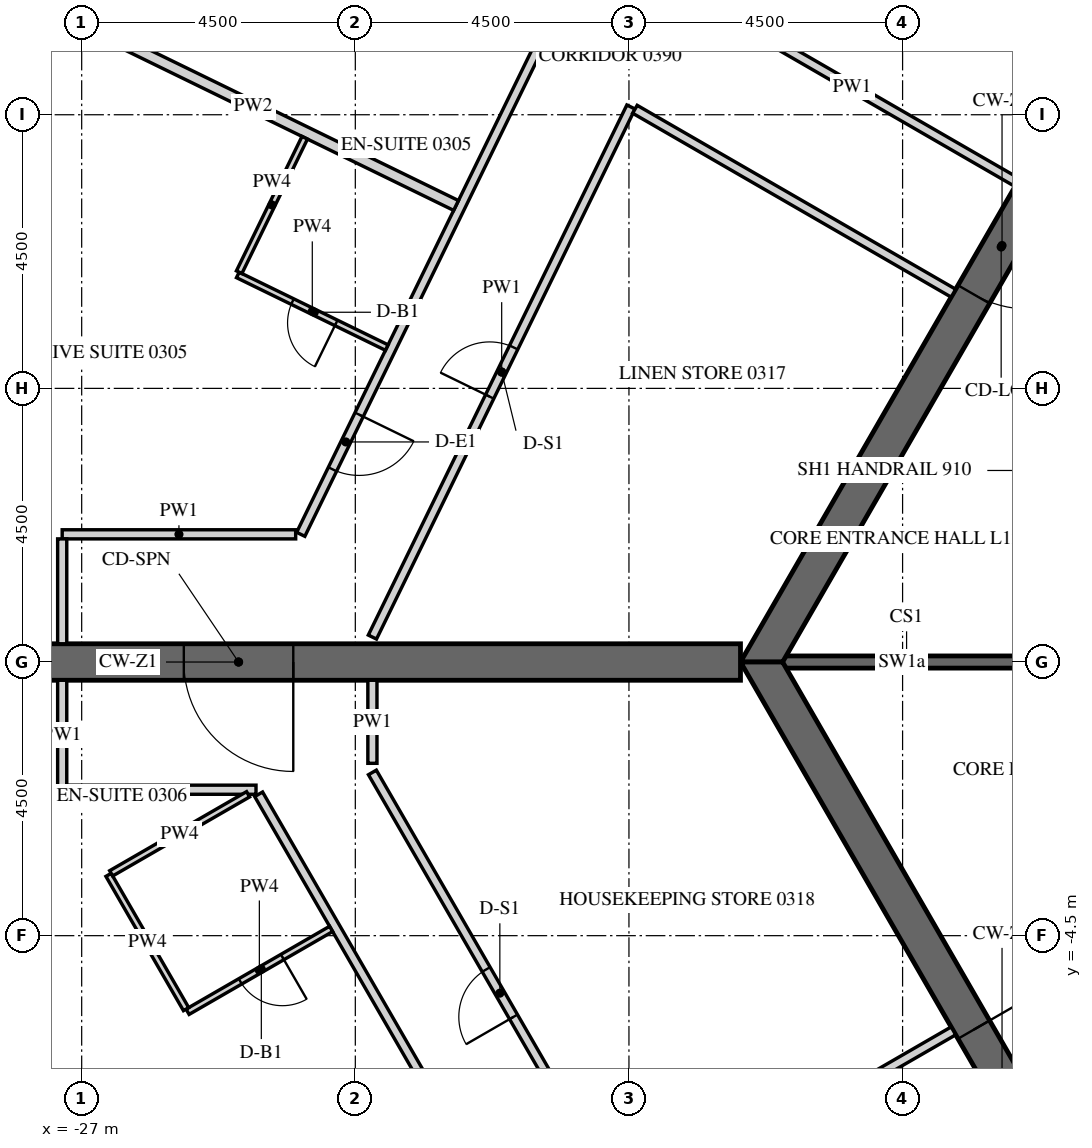
"""IFC4 building model, lengths in metres.
Left out: names, types, materials, properties, quantities, classifications, styles, units other than length and angle.
Written with IfcOpenShell. Run it as: python <this file> out.ifc"""

import sys

from ifc_helpers import new_model, si_unit, direction, frame, frame_2d, origin, place, context, subcontext, project, spatial, polyline, rectangle, outline, extrude, element, fill, save


model = new_model("IFC4")
c1 = context("Model", 3, precision=1e-05, world=origin(), true_north=direction((0.0, 1.0)))
c2 = subcontext(c1, "Body", "Model", "MODEL_VIEW")
j1 = project(units=[si_unit("LENGTHUNIT", "METRE"), si_unit("PLANEANGLEUNIT", "RADIAN")], contexts=[c1])
p1 = place(None, origin())
s1 = spatial("IfcSite", under=j1, at=p1, CompositionType="ELEMENT")
p2 = place(p1, origin())
s2 = spatial("IfcBuilding", under=s1, at=p2, CompositionType="ELEMENT")
p3 = place(p2, frame((0.0, 0.0, 60.9)))
s3 = spatial("IfcBuildingStorey", under=s2, at=p3, CompositionType="ELEMENT", Elevation=60.9)
p4 = place(p3, frame((-19.595, 27.633, -0.15), z_axis=(0.0, 0.0, 1.0), x_axis=(-0.438368285794, -0.898795441694, 0.0)))
e1 = element("IfcWall", 1, at=p4, inside=s3, PredefinedType="SOLIDWALL", context=c2, shape_type="SweptSolid", body=[
    extrude(outline(polyline([(-0.026, -0.275), (30.093, -0.275), (30.048, 0.275), (0.026, 0.275), (-0.026, -0.275)])), origin(), (0.0, 0.0, 1.0), 3.9),
])
p5 = place(p4, frame((1.236, 0.0, 1.05)))
e2 = element("IfcOpeningElement", 2, at=p5, cuts=e1, PredefinedType="OPENING", context=c2, shape_type="SweptSolid", body=[
    extrude(rectangle(XDim=2.4, YDim=2.4, at=frame_2d((1.2, 1.2))), frame((0.0, 0.285, 0.0), z_axis=(0.0, -1.0, 0.0), x_axis=(1.0, 0.0, 0.0)), (0.0, 0.0, 1.0), 0.57),
])
p6 = place(p4, frame((4.835, 0.0, 1.05)))
e3 = element("IfcOpeningElement", 3, at=p6, cuts=e1, PredefinedType="OPENING", context=c2, shape_type="SweptSolid", body=[
    extrude(rectangle(XDim=2.4, YDim=2.4, at=frame_2d((1.2, 1.2))), frame((0.0, 0.285, 0.0), z_axis=(0.0, -1.0, 0.0), x_axis=(1.0, 0.0, 0.0)), (0.0, 0.0, 1.0), 0.57),
])
p7 = place(p4, frame((8.436, 0.0, 1.05)))
e4 = element("IfcOpeningElement", 4, at=p7, cuts=e1, PredefinedType="OPENING", context=c2, shape_type="SweptSolid", body=[
    extrude(rectangle(XDim=2.4, YDim=2.4, at=frame_2d((1.2, 1.2))), frame((0.0, 0.285, 0.0), z_axis=(0.0, -1.0, 0.0), x_axis=(1.0, 0.0, 0.0)), (0.0, 0.0, 1.0), 0.57),
])
p8 = place(p4, frame((12.035, 0.0, 1.05)))
e5 = element("IfcOpeningElement", 5, at=p8, cuts=e1, PredefinedType="OPENING", context=c2, shape_type="SweptSolid", body=[
    extrude(rectangle(XDim=2.4, YDim=2.4, at=frame_2d((1.2, 1.2))), frame((0.0, 0.285, 0.0), z_axis=(0.0, -1.0, 0.0), x_axis=(1.0, 0.0, 0.0)), (0.0, 0.0, 1.0), 0.57),
])
p9 = place(p4, frame((15.635, 0.0, 1.05)))
e6 = element("IfcOpeningElement", 6, at=p9, cuts=e1, PredefinedType="OPENING", context=c2, shape_type="SweptSolid", body=[
    extrude(rectangle(XDim=2.4, YDim=2.4, at=frame_2d((1.2, 1.2))), frame((0.0, 0.285, 0.0), z_axis=(0.0, -1.0, 0.0), x_axis=(1.0, 0.0, 0.0)), (0.0, 0.0, 1.0), 0.57),
])
p10 = place(p4, frame((19.236, 0.0, 1.05)))
e7 = element("IfcOpeningElement", 7, at=p10, cuts=e1, PredefinedType="OPENING", context=c2, shape_type="SweptSolid", body=[
    extrude(rectangle(XDim=2.4, YDim=2.4, at=frame_2d((1.2, 1.2))), frame((0.0, 0.285, 0.0), z_axis=(0.0, -1.0, 0.0), x_axis=(1.0, 0.0, 0.0)), (0.0, 0.0, 1.0), 0.57),
])
p11 = place(p4, frame((22.835, 0.0, 1.05)))
e8 = element("IfcOpeningElement", 8, at=p11, cuts=e1, PredefinedType="OPENING", context=c2, shape_type="SweptSolid", body=[
    extrude(rectangle(XDim=2.4, YDim=2.4, at=frame_2d((1.2, 1.2))), frame((0.0, 0.285, 0.0), z_axis=(0.0, -1.0, 0.0), x_axis=(1.0, 0.0, 0.0)), (0.0, 0.0, 1.0), 0.57),
])
p12 = place(p4, frame((26.436, 0.0, 1.05)))
e9 = element("IfcOpeningElement", 9, at=p12, cuts=e1, PredefinedType="OPENING", context=c2, shape_type="SweptSolid", body=[
    extrude(rectangle(XDim=2.4, YDim=2.4, at=frame_2d((1.2, 1.2))), frame((0.0, 0.285, 0.0), z_axis=(0.0, -1.0, 0.0), x_axis=(1.0, 0.0, 0.0)), (0.0, 0.0, 1.0), 0.57),
])
p13 = place(p3, frame((-32.655, -2.89, -0.15), z_axis=(0.0, 0.0, 1.0), x_axis=(0.499997711317, -0.866026725152, 0.0)))
e10 = element("IfcWall", 10, at=p13, inside=s3, PredefinedType="SOLIDWALL", context=c2, shape_type="SweptSolid", body=[
    extrude(outline(polyline([(-0.022, -0.275), (30.097, -0.275), (30.045, 0.275), (0.022, 0.275), (-0.022, -0.275)])), origin(), (0.0, 0.0, 1.0), 3.9),
])
p14 = place(p13, frame((1.236, 0.0, 1.05)))
e11 = element("IfcOpeningElement", 11, at=p14, cuts=e10, PredefinedType="OPENING", context=c2, shape_type="SweptSolid", body=[
    extrude(rectangle(XDim=2.4, YDim=2.4, at=frame_2d((1.2, 1.2))), frame((0.0, 0.285, 0.0), z_axis=(0.0, -1.0, 0.0), x_axis=(1.0, 0.0, 0.0)), (0.0, 0.0, 1.0), 0.57),
])
p15 = place(p13, frame((4.835, 0.0, 1.05)))
e12 = element("IfcOpeningElement", 12, at=p15, cuts=e10, PredefinedType="OPENING", context=c2, shape_type="SweptSolid", body=[
    extrude(rectangle(XDim=2.4, YDim=2.4, at=frame_2d((1.2, 1.2))), frame((0.0, 0.285, 0.0), z_axis=(0.0, -1.0, 0.0), x_axis=(1.0, 0.0, 0.0)), (0.0, 0.0, 1.0), 0.57),
])
p16 = place(p13, frame((8.436, 0.0, 1.05)))
e13 = element("IfcOpeningElement", 13, at=p16, cuts=e10, PredefinedType="OPENING", context=c2, shape_type="SweptSolid", body=[
    extrude(rectangle(XDim=2.4, YDim=2.4, at=frame_2d((1.2, 1.2))), frame((0.0, 0.285, 0.0), z_axis=(0.0, -1.0, 0.0), x_axis=(1.0, 0.0, 0.0)), (0.0, 0.0, 1.0), 0.57),
])
p17 = place(p13, frame((12.035, 0.0, 1.05)))
e14 = element("IfcOpeningElement", 14, at=p17, cuts=e10, PredefinedType="OPENING", context=c2, shape_type="SweptSolid", body=[
    extrude(rectangle(XDim=2.4, YDim=2.4, at=frame_2d((1.2, 1.2))), frame((0.0, 0.285, 0.0), z_axis=(0.0, -1.0, 0.0), x_axis=(1.0, 0.0, 0.0)), (0.0, 0.0, 1.0), 0.57),
])
p18 = place(p13, frame((15.635, 0.0, 1.05)))
e15 = element("IfcOpeningElement", 15, at=p18, cuts=e10, PredefinedType="OPENING", context=c2, shape_type="SweptSolid", body=[
    extrude(rectangle(XDim=2.4, YDim=2.4, at=frame_2d((1.2, 1.2))), frame((0.0, 0.285, 0.0), z_axis=(0.0, -1.0, 0.0), x_axis=(1.0, 0.0, 0.0)), (0.0, 0.0, 1.0), 0.57),
])
p19 = place(p13, frame((19.236, 0.0, 1.05)))
e16 = element("IfcOpeningElement", 16, at=p19, cuts=e10, PredefinedType="OPENING", context=c2, shape_type="SweptSolid", body=[
    extrude(rectangle(XDim=2.4, YDim=2.4, at=frame_2d((1.2, 1.2))), frame((0.0, 0.285, 0.0), z_axis=(0.0, -1.0, 0.0), x_axis=(1.0, 0.0, 0.0)), (0.0, 0.0, 1.0), 0.57),
])
p20 = place(p13, frame((22.835, 0.0, 1.05)))
e17 = element("IfcOpeningElement", 17, at=p20, cuts=e10, PredefinedType="OPENING", context=c2, shape_type="SweptSolid", body=[
    extrude(rectangle(XDim=2.4, YDim=2.4, at=frame_2d((1.2, 1.2))), frame((0.0, 0.285, 0.0), z_axis=(0.0, -1.0, 0.0), x_axis=(1.0, 0.0, 0.0)), (0.0, 0.0, 1.0), 0.57),
])
p21 = place(p13, frame((26.436, 0.0, 1.05)))
e18 = element("IfcOpeningElement", 18, at=p21, cuts=e10, PredefinedType="OPENING", context=c2, shape_type="SweptSolid", body=[
    extrude(rectangle(XDim=2.4, YDim=2.4, at=frame_2d((1.2, 1.2))), frame((0.0, 0.285, 0.0), z_axis=(0.0, -1.0, 0.0), x_axis=(1.0, 0.0, 0.0)), (0.0, 0.0, 1.0), 0.57),
])
p22 = place(p3, frame((-7.91, 13.7, -0.15), z_axis=(0.0, 0.0, 1.0), x_axis=(-0.499999880136, -0.866025472988, 0.0)))
e19 = element("IfcWall", 19, at=p22, inside=s3, PredefinedType="SHEAR", context=c2, shape_type="SweptSolid", body=[
    extrude(outline(polyline([(-0.173, -0.3), (15.993, -0.3), (15.646, 0.3), (0.173, 0.3), (-0.173, -0.3)])), origin(), (0.0, 0.0, 1.0), 3.9),
])
p23 = place(p22, frame((7.039, 0.0, 0.15)))
e20 = element("IfcOpeningElement", 20, at=p23, cuts=e19, PredefinedType="OPENING", context=c2, shape_type="SweptSolid", body=[
    extrude(rectangle(XDim=1.8, YDim=2.4, at=frame_2d((0.9, 1.2))), frame((0.0, 0.31, 0.0), z_axis=(0.0, -1.0, 0.0), x_axis=(1.0, 0.0, 0.0)), (0.0, 0.0, 1.0), 0.62),
])
p24 = place(p3, frame((-15.819, 0.0, -0.15), z_axis=(0.0, 0.0, 1.0), x_axis=(0.499999880136, -0.866025472988, 0.0)))
e21 = element("IfcWall", 21, at=p24, inside=s3, PredefinedType="SHEAR", context=c2, shape_type="SweptSolid", body=[
    extrude(outline(polyline([(-0.173, -0.3), (15.993, -0.3), (15.646, 0.3), (0.173, 0.3), (-0.173, -0.3)])), origin(), (0.0, 0.0, 1.0), 3.9),
])
p25 = place(p24, frame((6.981, 0.0, 0.15)))
e22 = element("IfcOpeningElement", 22, at=p25, cuts=e21, PredefinedType="OPENING", context=c2, shape_type="SweptSolid", body=[
    extrude(rectangle(XDim=1.8, YDim=2.4, at=frame_2d((0.9, 1.2))), frame((0.0, 0.31, 0.0), z_axis=(0.0, -1.0, 0.0), x_axis=(1.0, 0.0, 0.0)), (0.0, 0.0, 1.0), 0.62),
])
p26 = place(p3, frame((-16.166, 0.0, -0.15), z_axis=(0.0, 0.0, 1.0), x_axis=(-1.0, 0.0, 0.0)))
e23 = element("IfcWall", 23, at=p26, inside=s3, PredefinedType="SHEAR", context=c2, shape_type="SweptSolid", body=[
    extrude(rectangle(XDim=16.509, YDim=0.6, at=frame_2d((8.254, 0.0))), origin(), (0.0, 0.0, 1.0), 3.9),
])
p27 = place(p26, frame((7.354, 0.0, 0.15)))
e24 = element("IfcOpeningElement", 24, at=p27, cuts=e23, PredefinedType="OPENING", context=c2, shape_type="SweptSolid", body=[
    extrude(rectangle(XDim=1.8, YDim=2.4, at=frame_2d((0.9, 1.2))), frame((0.0, 0.31, 0.0), z_axis=(0.0, -1.0, 0.0), x_axis=(1.0, 0.0, 0.0)), (0.0, 0.0, 1.0), 0.62),
])
p28 = place(p3, frame((-11.547, 0.0, -0.15), z_axis=(0.0, 0.0, 1.0), x_axis=(-1.0, 0.0, 0.0)))
e25 = element("IfcWall", 25, at=p28, inside=s3, PredefinedType="SHEAR", context=c2, shape_type="SweptSolid", body=[
    extrude(rectangle(XDim=3.926, YDim=0.2, at=frame_2d((1.963, 0.0))), origin(), (0.0, 0.0, 1.0), 3.9),
])
p29 = place(p3, frame((-13.752, 21.875, 0.0), z_axis=(0.0, 0.0, 1.0), x_axis=(-0.438376846054, -0.898791266559, 0.0)))
e26 = element("IfcWall", 26, at=p29, inside=s3, PredefinedType="PARTITIONING", context=c2, shape_type="SweptSolid", body=[
    extrude(rectangle(XDim=22.002, YDim=0.15, at=frame_2d((11.001, 0.0))), origin(), (0.0, 0.0, 1.0), 2.988),
])
p30 = place(p29, frame((3.269, 0.0, 0.0)))
e27 = element("IfcOpeningElement", 27, at=p30, cuts=e26, PredefinedType="OPENING", context=c2, shape_type="SweptSolid", body=[
    extrude(rectangle(XDim=1.0, YDim=2.1, at=frame_2d((0.5, 1.05))), frame((0.0, 0.085, 0.0), z_axis=(0.0, -1.0, 0.0), x_axis=(1.0, 0.0, 0.0)), (0.0, 0.0, 1.0), 0.17),
])
p31 = place(p29, frame((11.321, 0.0, 0.0)))
e28 = element("IfcOpeningElement", 28, at=p31, cuts=e26, PredefinedType="OPENING", context=c2, shape_type="SweptSolid", body=[
    extrude(rectangle(XDim=1.0, YDim=2.1, at=frame_2d((0.5, 1.05))), frame((0.0, 0.085, 0.0), z_axis=(0.0, -1.0, 0.0), x_axis=(1.0, 0.0, 0.0)), (0.0, 0.0, 1.0), 0.17),
])
p32 = place(p29, frame((19.812, 0.0, 0.0)))
e29 = element("IfcOpeningElement", 29, at=p32, cuts=e26, PredefinedType="OPENING", context=c2, shape_type="SweptSolid", body=[
    extrude(rectangle(XDim=1.0, YDim=2.1, at=frame_2d((0.5, 1.05))), frame((0.0, 0.085, 0.0), z_axis=(0.0, -1.0, 0.0), x_axis=(1.0, 0.0, 0.0)), (0.0, 0.0, 1.0), 0.17),
])
p33 = place(p3, frame((-23.481, 2.1, 0.0), z_axis=(0.0, 0.0, 1.0), x_axis=(-1.0, 0.0, 0.0)))
e30 = element("IfcWall", 30, at=p33, inside=s3, PredefinedType="PARTITIONING", context=c2, shape_type="SweptSolid", body=[
    extrude(rectangle(XDim=3.84, YDim=0.15, at=frame_2d((1.92, 0.0))), origin(), (0.0, 0.0, 1.0), 2.988),
])
p34 = place(p3, frame((-27.32, 2.025, 0.0), z_axis=(0.0, 0.0, 1.0), x_axis=(0.0, -1.0, 0.0)))
e31 = element("IfcWall", 31, at=p34, inside=s3, PredefinedType="PARTITIONING", context=c2, shape_type="SweptSolid", body=[
    extrude(rectangle(XDim=1.725, YDim=0.15, at=frame_2d((0.862, 0.0))), origin(), (0.0, 0.0, 1.0), 2.988),
])
p35 = place(p3, frame((-11.614, 7.884, 0.0), z_axis=(0.0, 0.0, 1.0), x_axis=(-0.866025438137, 0.4999999405, 0.0)))
e32 = element("IfcWall", 32, at=p35, inside=s3, PredefinedType="PARTITIONING", context=c2, shape_type="SweptSolid", body=[
    extrude(rectangle(XDim=6.271, YDim=0.15, at=frame_2d((3.135, 0.0))), origin(), (0.0, 0.0, 1.0), 2.988),
])
p36 = place(p3, frame((-22.219, 0.41, 0.0), z_axis=(0.0, 0.0, 1.0), x_axis=(0.438391891827, 0.898783927972, 0.0)))
e33 = element("IfcWall", 33, at=p36, inside=s3, PredefinedType="PARTITIONING", context=c2, shape_type="SweptSolid", body=[
    extrude(rectangle(XDim=9.699, YDim=0.15, at=frame_2d((4.85, 0.0))), origin(), (0.0, 0.0, 1.0), 2.988),
])
p37 = place(p36, frame((4.4, 0.0, 0.0)))
e34 = element("IfcOpeningElement", 34, at=p37, cuts=e33, PredefinedType="OPENING", context=c2, shape_type="SweptSolid", body=[
    extrude(rectangle(XDim=0.9, YDim=2.1, at=frame_2d((0.45, 1.05))), frame((0.0, 0.085, 0.0), z_axis=(0.0, -1.0, 0.0), x_axis=(1.0, 0.0, 0.0)), (0.0, 0.0, 1.0), 0.17),
])
p38 = place(p3, frame((-17.902, 9.09, 0.0), z_axis=(0.0, 0.0, 1.0), x_axis=(0.866036368755, -0.499981007633, 0.0)))
e35 = element("IfcWall", 35, at=p38, inside=s3, PredefinedType="PARTITIONING", context=c2, shape_type="SweptSolid", body=[
    extrude(rectangle(XDim=6.049, YDim=0.15, at=frame_2d((3.024, 0.0))), origin(), (0.0, 0.0, 1.0), 2.988),
])
p39 = place(p3, frame((-27.32, -0.3, 0.0), z_axis=(0.0, 0.0, 1.0), x_axis=(0.0, -1.0, 0.0)))
e36 = element("IfcWall", 36, at=p39, inside=s3, PredefinedType="PARTITIONING", context=c2, shape_type="SweptSolid", body=[
    extrude(rectangle(XDim=1.8, YDim=0.15, at=frame_2d((0.9, 0.0))), origin(), (0.0, 0.0, 1.0), 2.988),
])
p40 = place(p3, frame((-27.245, -2.1, 0.0), z_axis=(0.0, 0.0, 1.0), x_axis=(1.0, 0.0, 0.0)))
e37 = element("IfcWall", 37, at=p40, inside=s3, PredefinedType="PARTITIONING", context=c2, shape_type="SweptSolid", body=[
    extrude(rectangle(XDim=3.112, YDim=0.15, at=frame_2d((1.556, 0.0))), origin(), (0.0, 0.0, 1.0), 2.988),
])
p41 = place(p3, frame((-24.09, -2.175, 0.0), z_axis=(0.0, 0.0, 1.0), x_axis=(0.499996832073, -0.86602723278, 0.0)))
e38 = element("IfcWall", 38, at=p41, inside=s3, PredefinedType="PARTITIONING", context=c2, shape_type="SweptSolid", body=[
    extrude(rectangle(XDim=23.877, YDim=0.15, at=frame_2d((11.938, 0.0))), origin(), (0.0, 0.0, 1.0), 2.988),
])
p42 = place(p41, frame((6.443, 0.0, 0.0)))
e39 = element("IfcOpeningElement", 39, at=p42, cuts=e38, PredefinedType="OPENING", context=c2, shape_type="SweptSolid", body=[
    extrude(rectangle(XDim=1.0, YDim=2.1, at=frame_2d((0.5, 1.05))), frame((0.0, 0.085, 0.0), z_axis=(0.0, -1.0, 0.0), x_axis=(1.0, 0.0, 0.0)), (0.0, 0.0, 1.0), 0.17),
])
p43 = place(p41, frame((18.425, 0.0, 0.0)))
e40 = element("IfcOpeningElement", 40, at=p43, cuts=e38, PredefinedType="OPENING", context=c2, shape_type="SweptSolid", body=[
    extrude(rectangle(XDim=1.0, YDim=2.1, at=frame_2d((0.5, 1.05))), frame((0.0, 0.085, 0.0), z_axis=(0.0, -1.0, 0.0), x_axis=(1.0, 0.0, 0.0)), (0.0, 0.0, 1.0), 0.17),
])
p44 = place(p3, frame((-12.664, -6.066, 0.0), z_axis=(0.0, 0.0, 1.0), x_axis=(-0.866023618125, -0.500003092839, 0.0)))
e41 = element("IfcWall", 41, at=p44, inside=s3, PredefinedType="PARTITIONING", context=c2, shape_type="SweptSolid", body=[
    extrude(rectangle(XDim=6.15, YDim=0.15, at=frame_2d((3.075, 0.0))), origin(), (0.0, 0.0, 1.0), 2.988),
])
p45 = place(p3, frame((-18.027, -9.076, 0.0), z_axis=(0.0, 0.0, 1.0), x_axis=(-0.500007318041, 0.86602117867, 0.0)))
e42 = element("IfcWall", 42, at=p45, inside=s3, PredefinedType="PARTITIONING", context=c2, shape_type="SweptSolid", body=[
    extrude(rectangle(XDim=8.383, YDim=0.15, at=frame_2d((4.191, 0.0))), origin(), (0.0, 0.0, 1.0), 2.988),
])
p46 = place(p45, frame((3.742, 0.0, 0.0)))
e43 = element("IfcOpeningElement", 43, at=p46, cuts=e42, PredefinedType="OPENING", context=c2, shape_type="SweptSolid", body=[
    extrude(rectangle(XDim=0.9, YDim=2.1, at=frame_2d((0.45, 1.05))), frame((0.0, 0.085, 0.0), z_axis=(0.0, -1.0, 0.0), x_axis=(1.0, 0.0, 0.0)), (0.0, 0.0, 1.0), 0.17),
])
p47 = place(p3, frame((-22.219, -1.666, 0.0), z_axis=(0.0, 0.0, 1.0), x_axis=(0.0, 1.0, 0.0)))
e44 = element("IfcWall", 44, at=p47, inside=s3, PredefinedType="PARTITIONING", context=c2, shape_type="SweptSolid", body=[
    extrude(rectangle(XDim=1.366, YDim=0.15, at=frame_2d((0.683, 0.0))), origin(), (0.0, 0.0, 1.0), 2.988),
])
p48 = place(p3, frame((-27.517, 10.763, 0.0), z_axis=(0.0, 0.0, 1.0), x_axis=(0.898789933843, -0.438379578473, 0.0)))
e45 = element("IfcWall", 45, at=p48, inside=s3, PredefinedType="PARTITIONING", context=c2, shape_type="SweptSolid", body=[
    extrude(rectangle(XDim=7.425, YDim=0.18, at=frame_2d((3.712, 0.0))), origin(), (0.0, 0.0, 1.0), 2.988),
])
p49 = place(p3, frame((-21.983, 5.171, 0.0), z_axis=(0.0, 0.0, 1.0), x_axis=(-0.898791692788, 0.43837597217, 0.0)))
e46 = element("IfcWall", 46, at=p49, inside=s3, PredefinedType="PARTITIONING", context=c2, shape_type="SweptSolid", body=[
    extrude(rectangle(XDim=2.725, YDim=0.1, at=frame_2d((1.363, 0.0))), origin(), (0.0, 0.0, 1.0), 2.988),
])
p50 = place(p49, frame((0.925, 0.0, 0.0)))
e47 = element("IfcOpeningElement", 47, at=p50, cuts=e46, PredefinedType="OPENING", context=c2, shape_type="SweptSolid", body=[
    extrude(rectangle(XDim=0.8, YDim=2.1, at=frame_2d((0.4, 1.05))), frame((0.0, 0.06, 0.0), z_axis=(0.0, -1.0, 0.0), x_axis=(1.0, 0.0, 0.0)), (0.0, 0.0, 1.0), 0.12),
])
p51 = place(p3, frame((-24.41, 6.411, 0.0), z_axis=(0.0, 0.0, 1.0), x_axis=(0.438378657462, 0.89879038306, 0.0)))
e48 = element("IfcWall", 48, at=p51, inside=s3, PredefinedType="PARTITIONING", context=c2, shape_type="SweptSolid", body=[
    extrude(rectangle(XDim=2.46, YDim=0.1, at=frame_2d((1.23, 0.0))), origin(), (0.0, 0.0, 1.0), 2.988),
])
p52 = place(p3, frame((-22.898, -4.389, 0.0), z_axis=(0.0, 0.0, 1.0), x_axis=(-0.866012511928, -0.500022328685, 0.0)))
e49 = element("IfcWall", 49, at=p52, inside=s3, PredefinedType="PARTITIONING", context=c2, shape_type="SweptSolid", body=[
    extrude(rectangle(XDim=2.725, YDim=0.1, at=frame_2d((1.363, 0.0))), origin(), (0.0, 0.0, 1.0), 2.988),
])
p53 = place(p52, frame((0.925, 0.0, 0.0)))
e50 = element("IfcOpeningElement", 50, at=p53, cuts=e49, PredefinedType="OPENING", context=c2, shape_type="SweptSolid", body=[
    extrude(rectangle(XDim=0.8, YDim=2.1, at=frame_2d((0.4, 1.05))), frame((0.0, 0.06, 0.0), z_axis=(0.0, -1.0, 0.0), x_axis=(1.0, 0.0, 0.0)), (0.0, 0.0, 1.0), 0.12),
])
p54 = place(p3, frame((-25.283, -5.708, 0.0), z_axis=(0.0, 0.0, 1.0), x_axis=(-0.499990435942, 0.866030925526, 0.0)))
e51 = element("IfcWall", 51, at=p54, inside=s3, PredefinedType="PARTITIONING", context=c2, shape_type="SweptSolid", body=[
    extrude(rectangle(XDim=2.55, YDim=0.1, at=frame_2d((1.275, 0.0))), origin(), (0.0, 0.0, 1.0), 2.988),
])
p55 = place(p3, frame((-26.515, -3.475, 0.0), z_axis=(0.0, 0.0, 1.0), x_axis=(0.866021400173, 0.500006934395, 0.0)))
e52 = element("IfcWall", 52, at=p55, inside=s3, PredefinedType="PARTITIONING", context=c2, shape_type="SweptSolid", body=[
    extrude(rectangle(XDim=2.6, YDim=0.1, at=frame_2d((1.3, 0.0))), origin(), (0.0, 0.0, 1.0), 2.988),
])
p56 = place(p23, origin())
e53 = element("IfcDoor", 53, at=p56, inside=s3, OperationType="DOUBLE_DOOR_SINGLE_SWING", PredefinedType="DOOR", context=c2, shape_type="SweptSolid", body=[
    extrude(rectangle(XDim=1.8, YDim=2.4, at=frame_2d((0.9, 1.2))), frame((0.0, 0.025, 0.0), z_axis=(0.0, -1.0, 0.0), x_axis=(1.0, 0.0, 0.0)), (0.0, 0.0, 1.0), 0.05),
])
fill(e20, e53)
p57 = place(p25, origin())
e54 = element("IfcDoor", 54, at=p57, inside=s3, OperationType="DOUBLE_DOOR_SINGLE_SWING", PredefinedType="DOOR", context=c2, shape_type="SweptSolid", body=[
    extrude(rectangle(XDim=1.8, YDim=2.4, at=frame_2d((0.9, 1.2))), frame((0.0, 0.025, 0.0), z_axis=(0.0, -1.0, 0.0), x_axis=(1.0, 0.0, 0.0)), (0.0, 0.0, 1.0), 0.05),
])
fill(e22, e54)
p58 = place(p27, origin())
e55 = element("IfcDoor", 55, at=p58, inside=s3, OperationType="DOUBLE_DOOR_SINGLE_SWING", PredefinedType="DOOR", context=c2, shape_type="SweptSolid", body=[
    extrude(rectangle(XDim=1.8, YDim=2.4, at=frame_2d((0.9, 1.2))), frame((0.0, 0.025, 0.0), z_axis=(0.0, -1.0, 0.0), x_axis=(1.0, 0.0, 0.0)), (0.0, 0.0, 1.0), 0.05),
])
fill(e24, e55)
p59 = place(p32, origin())
e56 = element("IfcDoor", 56, at=p59, inside=s3, OperationType="SINGLE_SWING_RIGHT", PredefinedType="DOOR", context=c2, shape_type="SweptSolid", body=[
    extrude(rectangle(XDim=1.0, YDim=2.1, at=frame_2d((0.5, 1.05))), frame((0.0, 0.025, 0.0), z_axis=(0.0, -1.0, 0.0), x_axis=(1.0, 0.0, 0.0)), (0.0, 0.0, 1.0), 0.05),
])
fill(e29, e56)
p60 = place(p50, origin())
e57 = element("IfcDoor", 57, at=p60, inside=s3, OperationType="SINGLE_SWING_RIGHT", PredefinedType="DOOR", context=c2, shape_type="SweptSolid", body=[
    extrude(rectangle(XDim=0.8, YDim=2.1, at=frame_2d((0.4, 1.05))), frame((0.0, 0.025, 0.0), z_axis=(0.0, -1.0, 0.0), x_axis=(1.0, 0.0, 0.0)), (0.0, 0.0, 1.0), 0.05),
])
fill(e47, e57)
p61 = place(p53, origin())
e58 = element("IfcDoor", 58, at=p61, inside=s3, OperationType="SINGLE_SWING_RIGHT", PredefinedType="DOOR", context=c2, shape_type="SweptSolid", body=[
    extrude(rectangle(XDim=0.8, YDim=2.1, at=frame_2d((0.4, 1.05))), frame((0.0, 0.025, 0.0), z_axis=(0.0, -1.0, 0.0), x_axis=(1.0, 0.0, 0.0)), (0.0, 0.0, 1.0), 0.05),
])
fill(e50, e58)
p62 = place(p37, origin())
e59 = element("IfcDoor", 59, at=p62, inside=s3, OperationType="SINGLE_SWING_LEFT", PredefinedType="DOOR", context=c2, shape_type="SweptSolid", body=[
    extrude(rectangle(XDim=0.9, YDim=2.1, at=frame_2d((0.45, 1.05))), frame((0.0, 0.025, 0.0), z_axis=(0.0, -1.0, 0.0), x_axis=(1.0, 0.0, 0.0)), (0.0, 0.0, 1.0), 0.05),
])
fill(e34, e59)
p63 = place(p46, origin())
e60 = element("IfcDoor", 60, at=p63, inside=s3, OperationType="SINGLE_SWING_RIGHT", PredefinedType="DOOR", context=c2, shape_type="SweptSolid", body=[
    extrude(rectangle(XDim=0.9, YDim=2.1, at=frame_2d((0.45, 1.05))), frame((0.0, 0.025, 0.0), z_axis=(0.0, -1.0, 0.0), x_axis=(1.0, 0.0, 0.0)), (0.0, 0.0, 1.0), 0.05),
])
fill(e43, e60)
save(model, sys.argv[1])
